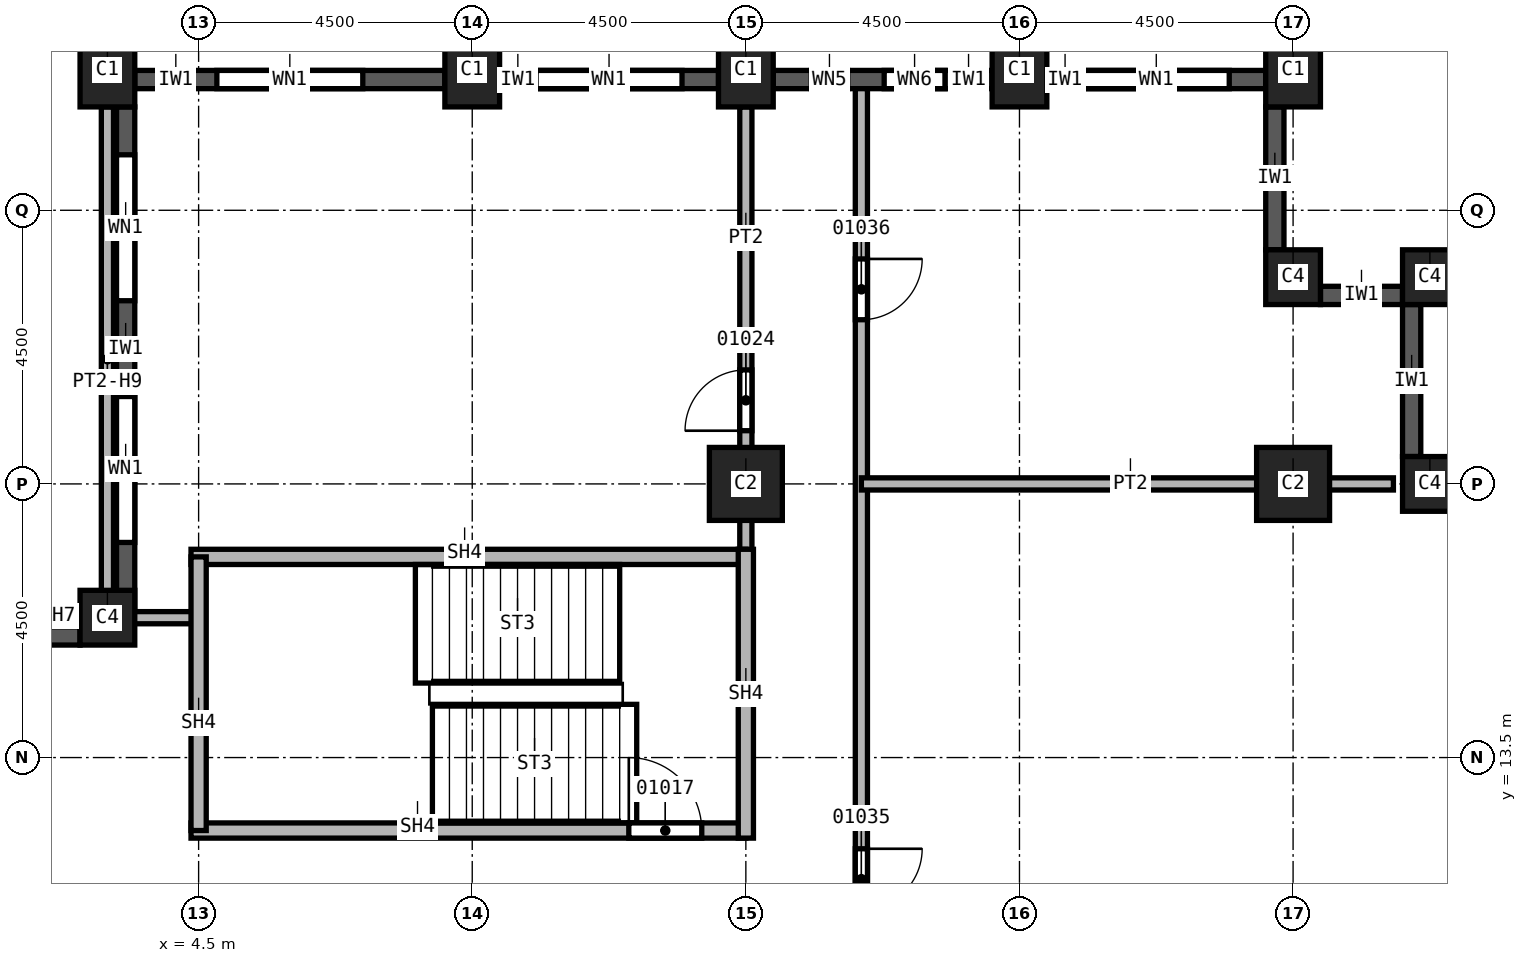
"""IFC4 building model, lengths in metres.
Left out: names, types, materials, properties, quantities, classifications, styles, units other than length and angle.
Written with IfcOpenShell. Run it as: python <this file> out.ifc"""

import sys

from ifc_helpers import new_model, si_unit, direction, frame, frame_2d, origin, origin_2d, place, context, subcontext, project, spatial, rectangle, extrude, element, fill, save


model = new_model("IFC4")
c1 = context("Model", 3, precision=1e-05, world=origin(), true_north=direction((0.0, 1.0)))
c2 = subcontext(c1, "Body", "Model", "MODEL_VIEW")
j1 = project(units=[si_unit("LENGTHUNIT", "METRE"), si_unit("PLANEANGLEUNIT", "RADIAN")], contexts=[c1])
p1 = place(None, origin())
s1 = spatial("IfcSite", under=j1, at=p1, CompositionType="ELEMENT")
p2 = place(p1, origin())
s2 = spatial("IfcBuilding", under=s1, at=p2, CompositionType="ELEMENT")
p3 = place(p2, frame((0.0, 0.0, 68.0)))
s3 = spatial("IfcBuildingStorey", under=s2, at=p3, CompositionType="ELEMENT", Elevation=68.0)
for number, where, z_axis, x_axis in (
    (1, (13.5, 18.0, 0.0), (0.0, 0.0, 1.0), (1.0, 0.0, 0.0)),
    (2, (22.5, 18.0, 0.0), (0.0, 0.0, 1.0), (1.0, 0.0, 0.0)),
):
    element("IfcColumn", number, at=place(p3, frame(where, z_axis=z_axis, x_axis=x_axis)), inside=s3, PredefinedType="COLUMN", context=c2, shape_type="SweptSolid", body=[
        extrude(rectangle(XDim=1.2, YDim=1.2, at=origin_2d()), origin(), (0.0, 0.0, 1.0), 3.7),
    ])
for number, where, z_axis, x_axis in (
    (3, (3.0, 24.8, 0.0), (0.0, 0.0, 1.0), (1.0, 0.0, 0.0)),
    (4, (9.0, 24.8, 0.0), (0.0, 0.0, 1.0), (1.0, 0.0, 0.0)),
    (5, (13.5, 24.8, 0.0), (0.0, 0.0, 1.0), (1.0, 0.0, 0.0)),
    (6, (18.0, 24.8, 0.0), (0.0, 0.0, 1.0), (1.0, 0.0, 0.0)),
    (7, (22.5, 24.8, 0.0), (0.0, 0.0, 1.0), (1.0, 0.0, 0.0)),
):
    element("IfcColumn", number, at=place(p3, frame(where, z_axis=z_axis, x_axis=x_axis)), inside=s3, PredefinedType="COLUMN", context=c2, shape_type="SweptSolid", body=[
        extrude(rectangle(XDim=0.9, YDim=1.2, at=origin_2d()), origin(), (0.0, 0.0, 1.0), 3.7),
    ])
for number, where, z_axis, x_axis in (
    (8, (3.0, 15.8, 0.0), (0.0, 0.0, 1.0), (1.0, 0.0, 0.0)),
    (9, (22.5, 21.4, 0.0), (0.0, 0.0, 1.0), (1.0, 0.0, 0.0)),
    (10, (24.75, 21.4, 0.0), (0.0, 0.0, 1.0), (1.0, 0.0, 0.0)),
    (11, (24.75, 18.0, 0.0), (0.0, 0.0, 1.0), (1.0, 0.0, 0.0)),
):
    element("IfcColumn", number, at=place(p3, frame(where, z_axis=z_axis, x_axis=x_axis)), inside=s3, PredefinedType="COLUMN", context=c2, shape_type="SweptSolid", body=[
        extrude(rectangle(XDim=0.9, YDim=0.9, at=origin_2d()), origin(), (0.0, 0.0, 1.0), 3.7),
    ])
p4 = place(p3, frame((24.45, 18.45, 0.0), z_axis=(0.0, 0.0, 1.0), x_axis=(0.0, 1.0, 0.0)))
e12 = element("IfcWall", 12, at=p4, inside=s3, PredefinedType="SOLIDWALL", context=c2, shape_type="SweptSolid", body=[
    extrude(rectangle(XDim=2.5, YDim=0.3, at=frame_2d((1.25, 0.0))), origin(), (0.0, 0.0, 1.0), 3.1),
])
p5 = place(p3, frame((24.3, 21.1, 0.0), z_axis=(0.0, 0.0, 1.0), x_axis=(-1.0, 0.0, 0.0)))
e13 = element("IfcWall", 13, at=p5, inside=s3, PredefinedType="SOLIDWALL", context=c2, shape_type="SweptSolid", body=[
    extrude(rectangle(XDim=1.35, YDim=0.3, at=frame_2d((0.675, 0.0))), origin(), (0.0, 0.0, 1.0), 3.1),
])
p6 = place(p3, frame((22.2, 21.85, 0.0), z_axis=(0.0, 0.0, 1.0), x_axis=(0.0, 1.0, 0.0)))
e14 = element("IfcWall", 14, at=p6, inside=s3, PredefinedType="SOLIDWALL", context=c2, shape_type="SweptSolid", body=[
    extrude(rectangle(XDim=2.35, YDim=0.3, at=frame_2d((1.175, 0.0))), origin(), (0.0, 0.0, 1.0), 3.1),
])
p7 = place(p3, frame((22.05, 24.65, 0.0), z_axis=(0.0, 0.0, 1.0), x_axis=(-1.0, 0.0, 0.0)))
e15 = element("IfcWall", 15, at=p7, inside=s3, PredefinedType="SOLIDWALL", context=c2, shape_type="SweptSolid", body=[
    extrude(rectangle(XDim=3.6, YDim=0.3, at=frame_2d((1.8, 0.0))), origin(), (0.0, 0.0, 1.0), 3.1),
])
p8 = place(p7, frame((0.6, 0.0, 0.8)))
e16 = element("IfcOpeningElement", 16, at=p8, cuts=e15, PredefinedType="OPENING", context=c2, shape_type="SweptSolid", body=[
    extrude(rectangle(XDim=2.4, YDim=1.95, at=frame_2d((1.2, 0.975))), frame((0.0, 0.15, 0.0), z_axis=(0.0, -1.0, 0.0), x_axis=(1.0, 0.0, 0.0)), (0.0, 0.0, 1.0), 0.3),
])
p9 = place(p3, frame((17.55, 24.65, 0.0), z_axis=(0.0, 0.0, 1.0), x_axis=(-1.0, 0.0, 0.0)))
e17 = element("IfcWall", 17, at=p9, inside=s3, PredefinedType="SOLIDWALL", context=c2, shape_type="SweptSolid", body=[
    extrude(rectangle(XDim=3.6, YDim=0.3, at=frame_2d((1.8, 0.0))), origin(), (0.0, 0.0, 1.0), 3.1),
])
p10 = place(p9, frame((0.775, 0.0, 0.8)))
e18 = element("IfcOpeningElement", 18, at=p10, cuts=e17, PredefinedType="OPENING", context=c2, shape_type="SweptSolid", body=[
    extrude(rectangle(XDim=1.0, YDim=1.95, at=frame_2d((0.5, 0.975))), frame((0.0, 0.15, 0.0), z_axis=(0.0, -1.0, 0.0), x_axis=(1.0, 0.0, 0.0)), (0.0, 0.0, 1.0), 0.3),
])
p11 = place(p9, frame((2.375, 0.0, 0.8)))
e19 = element("IfcOpeningElement", 19, at=p11, cuts=e17, PredefinedType="OPENING", context=c2, shape_type="SweptSolid", body=[
    extrude(rectangle(XDim=0.6, YDim=1.95, at=frame_2d((0.3, 0.975))), frame((0.0, 0.15, 0.0), z_axis=(0.0, -1.0, 0.0), x_axis=(1.0, 0.0, 0.0)), (0.0, 0.0, 1.0), 0.3),
])
p12 = place(p3, frame((13.05, 24.65, 0.0), z_axis=(0.0, 0.0, 1.0), x_axis=(-1.0, 0.0, 0.0)))
e20 = element("IfcWall", 20, at=p12, inside=s3, PredefinedType="SOLIDWALL", context=c2, shape_type="SweptSolid", body=[
    extrude(rectangle(XDim=3.6, YDim=0.3, at=frame_2d((1.8, 0.0))), origin(), (0.0, 0.0, 1.0), 3.1),
])
p13 = place(p12, frame((0.6, 0.0, 0.8)))
e21 = element("IfcOpeningElement", 21, at=p13, cuts=e20, PredefinedType="OPENING", context=c2, shape_type="SweptSolid", body=[
    extrude(rectangle(XDim=2.4, YDim=1.95, at=frame_2d((1.2, 0.975))), frame((0.0, 0.15, 0.0), z_axis=(0.0, -1.0, 0.0), x_axis=(1.0, 0.0, 0.0)), (0.0, 0.0, 1.0), 0.3),
])
p14 = place(p3, frame((8.55, 24.65, 0.0), z_axis=(0.0, 0.0, 1.0), x_axis=(-1.0, 0.0, 0.0)))
e22 = element("IfcWall", 22, at=p14, inside=s3, PredefinedType="SOLIDWALL", context=c2, shape_type="SweptSolid", body=[
    extrude(rectangle(XDim=5.1, YDim=0.3, at=frame_2d((2.55, 0.0))), origin(), (0.0, 0.0, 1.0), 3.1),
])
p15 = place(p14, frame((1.35, 0.0, 0.8)))
e23 = element("IfcOpeningElement", 23, at=p15, cuts=e22, PredefinedType="OPENING", context=c2, shape_type="SweptSolid", body=[
    extrude(rectangle(XDim=2.4, YDim=1.95, at=frame_2d((1.2, 0.975))), frame((0.0, 0.15, 0.0), z_axis=(0.0, -1.0, 0.0), x_axis=(1.0, 0.0, 0.0)), (0.0, 0.0, 1.0), 0.3),
])
p16 = place(p3, frame((3.3, 24.2, 0.0), z_axis=(0.0, 0.0, 1.0), x_axis=(0.0, -1.0, 0.0)))
e24 = element("IfcWall", 24, at=p16, inside=s3, PredefinedType="SOLIDWALL", context=c2, shape_type="SweptSolid", body=[
    extrude(rectangle(XDim=8.35, YDim=0.3, at=frame_2d((4.175, 0.0))), origin(), (0.0, 0.0, 1.0), 3.1),
])
p17 = place(p16, frame((0.788, 0.0, 0.8)))
e25 = element("IfcOpeningElement", 25, at=p17, cuts=e24, PredefinedType="OPENING", context=c2, shape_type="SweptSolid", body=[
    extrude(rectangle(XDim=2.4, YDim=1.95, at=frame_2d((1.2, 0.975))), frame((0.0, 0.15, 0.0), z_axis=(0.0, -1.0, 0.0), x_axis=(1.0, 0.0, 0.0)), (0.0, 0.0, 1.0), 0.3),
])
p18 = place(p16, frame((4.762, 0.0, 0.8)))
e26 = element("IfcOpeningElement", 26, at=p18, cuts=e24, PredefinedType="OPENING", context=c2, shape_type="SweptSolid", body=[
    extrude(rectangle(XDim=2.4, YDim=1.95, at=frame_2d((1.2, 0.975))), frame((0.0, 0.15, 0.0), z_axis=(0.0, -1.0, 0.0), x_axis=(1.0, 0.0, 0.0)), (0.0, 0.0, 1.0), 0.3),
])
p19 = place(p3, frame((-2.55, 15.5, 0.0), z_axis=(0.0, 0.0, 1.0), x_axis=(1.0, 0.0, 0.0)))
e27 = element("IfcWall", 27, at=p19, inside=s3, PredefinedType="SOLIDWALL", context=c2, shape_type="SweptSolid", body=[
    extrude(rectangle(XDim=5.1, YDim=0.3, at=frame_2d((2.55, 0.0))), origin(), (0.0, 0.0, 1.0), 3.1),
])
p20 = place(p19, frame((1.95, 0.0, 0.0)))
e28 = element("IfcOpeningElement", 28, at=p20, cuts=e27, PredefinedType="OPENING", context=c2, shape_type="SweptSolid", body=[
    extrude(rectangle(XDim=1.2, YDim=2.4, at=frame_2d((0.6, 1.2))), frame((0.0, 0.15, 0.0), z_axis=(0.0, -1.0, 0.0), x_axis=(1.0, 0.0, 0.0)), (0.0, 0.0, 1.0), 0.3),
])
p21 = place(p3, frame((0.9, 15.8, 0.0), z_axis=(0.0, 0.0, 1.0), x_axis=(1.0, 0.0, 0.0)))
e29 = element("IfcWall", 29, at=p21, inside=s3, PredefinedType="PARTITIONING", context=c2, shape_type="SweptSolid", body=[
    extrude(rectangle(XDim=3.6, YDim=0.2, at=frame_2d((1.8, 0.0))), origin(), (0.0, 0.0, 1.0), 3.083),
])
p22 = place(p3, frame((3.0, 24.2, 0.0), z_axis=(0.0, 0.0, 1.0), x_axis=(0.0, -1.0, 0.0)))
e30 = element("IfcWall", 30, at=p22, inside=s3, PredefinedType="PARTITIONING", context=c2, shape_type="SweptSolid", body=[
    extrude(rectangle(XDim=8.4, YDim=0.2, at=frame_2d((4.2, 0.0))), origin(), (0.0, 0.0, 1.0), 2.854),
])
p23 = place(p3, frame((13.5, 16.675, 0.0), z_axis=(0.0, 0.0, 1.0), x_axis=(0.0, 1.0, 0.0)))
e31 = element("IfcWall", 31, at=p23, inside=s3, PredefinedType="PARTITIONING", context=c2, shape_type="SweptSolid", body=[
    extrude(rectangle(XDim=7.525, YDim=0.2, at=frame_2d((3.762, 0.0))), origin(), (0.0, 0.0, 1.0), 3.7),
])
p24 = place(p23, frame((2.2, 0.0, 0.0)))
e32 = element("IfcOpeningElement", 32, at=p24, cuts=e31, PredefinedType="OPENING", context=c2, shape_type="SweptSolid", body=[
    extrude(rectangle(XDim=1.0, YDim=2.1, at=frame_2d((0.5, 1.05))), frame((0.0, 0.1, 0.0), z_axis=(0.0, -1.0, 0.0), x_axis=(1.0, 0.0, 0.0)), (0.0, 0.0, 1.0), 0.2),
])
p25 = place(p3, frame((15.4, 24.5, 0.0), z_axis=(0.0, 0.0, 1.0), x_axis=(0.0, -1.0, 0.0)))
e33 = element("IfcWall", 33, at=p25, inside=s3, PredefinedType="PARTITIONING", context=c2, shape_type="SweptSolid", body=[
    extrude(rectangle(XDim=25.35, YDim=0.2, at=frame_2d((12.675, 0.0))), origin(), (0.0, 0.0, 1.0), 3.7),
])
p26 = place(p25, frame((23.75, 0.0, 0.0)))
e34 = element("IfcOpeningElement", 34, at=p26, cuts=e33, PredefinedType="OPENING", context=c2, shape_type="SweptSolid", body=[
    extrude(rectangle(XDim=1.0, YDim=2.1, at=frame_2d((0.5, 1.05))), frame((0.0, 0.1, 0.0), z_axis=(0.0, -1.0, 0.0), x_axis=(1.0, 0.0, 0.0)), (0.0, 0.0, 1.0), 0.2),
])
p27 = place(p25, frame((12.5, 0.0, 0.0)))
e35 = element("IfcOpeningElement", 35, at=p27, cuts=e33, PredefinedType="OPENING", context=c2, shape_type="SweptSolid", body=[
    extrude(rectangle(XDim=1.0, YDim=2.1, at=frame_2d((0.5, 1.05))), frame((0.0, 0.1, 0.0), z_axis=(0.0, -1.0, 0.0), x_axis=(1.0, 0.0, 0.0)), (0.0, 0.0, 1.0), 0.2),
])
p28 = place(p25, frame((2.8, 0.0, 0.0)))
e36 = element("IfcOpeningElement", 36, at=p28, cuts=e33, PredefinedType="OPENING", context=c2, shape_type="SweptSolid", body=[
    extrude(rectangle(XDim=1.0, YDim=2.1, at=frame_2d((0.5, 1.05))), frame((0.0, 0.1, 0.0), z_axis=(0.0, -1.0, 0.0), x_axis=(1.0, 0.0, 0.0)), (0.0, 0.0, 1.0), 0.2),
])
p29 = place(p3, frame((15.4, 18.0, 0.0), z_axis=(0.0, 0.0, 1.0), x_axis=(1.0, 0.0, 0.0)))
e37 = element("IfcWall", 37, at=p29, inside=s3, PredefinedType="PARTITIONING", context=c2, shape_type="SweptSolid", body=[
    extrude(rectangle(XDim=8.75, YDim=0.2, at=frame_2d((4.375, 0.0))), origin(), (0.0, 0.0, 1.0), 3.7),
])
p30 = place(p3, frame((4.375, 12.3, 0.0), z_axis=(0.0, 0.0, 1.0), x_axis=(1.0, 0.0, 0.0)))
e38 = element("IfcWall", 38, at=p30, inside=s3, PredefinedType="SOLIDWALL", context=c2, shape_type="SweptSolid", body=[
    extrude(rectangle(XDim=9.125, YDim=0.25, at=frame_2d((4.562, 0.0))), origin(), (0.0, 0.0, 1.0), 3.7),
])
p31 = place(p30, frame((7.2, 0.0, 0.0)))
e39 = element("IfcOpeningElement", 39, at=p31, cuts=e38, PredefinedType="OPENING", context=c2, shape_type="SweptSolid", body=[
    extrude(rectangle(XDim=1.2, YDim=2.1, at=frame_2d((0.6, 1.05))), frame((0.0, 0.125, 0.0), z_axis=(0.0, -1.0, 0.0), x_axis=(1.0, 0.0, 0.0)), (0.0, 0.0, 1.0), 0.25),
])
p32 = place(p3, frame((4.375, 16.8, 0.0), z_axis=(0.0, 0.0, 1.0), x_axis=(1.0, 0.0, 0.0)))
e40 = element("IfcWall", 40, at=p32, inside=s3, PredefinedType="SOLIDWALL", context=c2, shape_type="SweptSolid", body=[
    extrude(rectangle(XDim=9.125, YDim=0.25, at=frame_2d((4.562, 0.0))), origin(), (0.0, 0.0, 1.0), 3.7),
])
p33 = place(p3, frame((4.5, 12.3, 0.0), z_axis=(0.0, 0.0, 1.0), x_axis=(0.0, 1.0, 0.0)))
e41 = element("IfcWall", 41, at=p33, inside=s3, PredefinedType="SOLIDWALL", context=c2, shape_type="SweptSolid", body=[
    extrude(rectangle(XDim=4.5, YDim=0.25, at=frame_2d((2.25, 0.0))), origin(), (0.0, 0.0, 1.0), 3.7),
])
p34 = place(p3, frame((13.5, 12.175, 0.0), z_axis=(0.0, 0.0, 1.0), x_axis=(0.0, 1.0, 0.0)))
e42 = element("IfcWall", 42, at=p34, inside=s3, PredefinedType="SOLIDWALL", context=c2, shape_type="SweptSolid", body=[
    extrude(rectangle(XDim=4.75, YDim=0.25, at=frame_2d((2.375, 0.0))), origin(), (0.0, 0.0, 1.0), 3.7),
])
p35 = place(p8, origin())
e43 = element("IfcWindow", 43, at=p35, inside=s3, PartitioningType="SINGLE_PANEL", PredefinedType="WINDOW", context=c2, shape_type="SweptSolid", body=[
    extrude(rectangle(XDim=2.4, YDim=1.95, at=frame_2d((1.2, 0.975))), frame((0.0, 0.03, 0.0), z_axis=(0.0, -1.0, 0.0), x_axis=(1.0, 0.0, 0.0)), (0.0, 0.0, 1.0), 0.06),
])
fill(e16, e43)
p36 = place(p13, origin())
e44 = element("IfcWindow", 44, at=p36, inside=s3, PartitioningType="SINGLE_PANEL", PredefinedType="WINDOW", context=c2, shape_type="SweptSolid", body=[
    extrude(rectangle(XDim=2.4, YDim=1.95, at=frame_2d((1.2, 0.975))), frame((0.0, 0.03, 0.0), z_axis=(0.0, -1.0, 0.0), x_axis=(1.0, 0.0, 0.0)), (0.0, 0.0, 1.0), 0.06),
])
fill(e21, e44)
p37 = place(p15, origin())
e45 = element("IfcWindow", 45, at=p37, inside=s3, PartitioningType="SINGLE_PANEL", PredefinedType="WINDOW", context=c2, shape_type="SweptSolid", body=[
    extrude(rectangle(XDim=2.4, YDim=1.95, at=frame_2d((1.2, 0.975))), frame((0.0, 0.03, 0.0), z_axis=(0.0, -1.0, 0.0), x_axis=(1.0, 0.0, 0.0)), (0.0, 0.0, 1.0), 0.06),
])
fill(e23, e45)
p38 = place(p17, origin())
e46 = element("IfcWindow", 46, at=p38, inside=s3, PartitioningType="SINGLE_PANEL", PredefinedType="WINDOW", context=c2, shape_type="SweptSolid", body=[
    extrude(rectangle(XDim=2.4, YDim=1.95, at=frame_2d((1.2, 0.975))), frame((0.0, 0.03, 0.0), z_axis=(0.0, -1.0, 0.0), x_axis=(1.0, 0.0, 0.0)), (0.0, 0.0, 1.0), 0.06),
])
fill(e25, e46)
p39 = place(p18, origin())
e47 = element("IfcWindow", 47, at=p39, inside=s3, PartitioningType="SINGLE_PANEL", PredefinedType="WINDOW", context=c2, shape_type="SweptSolid", body=[
    extrude(rectangle(XDim=2.4, YDim=1.95, at=frame_2d((1.2, 0.975))), frame((0.0, 0.03, 0.0), z_axis=(0.0, -1.0, 0.0), x_axis=(1.0, 0.0, 0.0)), (0.0, 0.0, 1.0), 0.06),
])
fill(e26, e47)
p40 = place(p31, origin())
e48 = element("IfcDoor", 48, at=p40, inside=s3, OperationType="SINGLE_SWING_RIGHT", PredefinedType="DOOR", context=c2, shape_type="SweptSolid", body=[
    extrude(rectangle(XDim=1.2, YDim=2.1, at=frame_2d((0.6, 1.05))), frame((0.0, 0.025, 0.0), z_axis=(0.0, -1.0, 0.0), x_axis=(1.0, 0.0, 0.0)), (0.0, 0.0, 1.0), 0.05),
])
fill(e39, e48)
p41 = place(p24, origin())
e49 = element("IfcDoor", 49, at=p41, inside=s3, OperationType="SINGLE_SWING_LEFT", PredefinedType="DOOR", context=c2, shape_type="SweptSolid", body=[
    extrude(rectangle(XDim=1.0, YDim=2.1, at=frame_2d((0.5, 1.05))), frame((0.0, 0.025, 0.0), z_axis=(0.0, -1.0, 0.0), x_axis=(1.0, 0.0, 0.0)), (0.0, 0.0, 1.0), 0.05),
])
fill(e32, e49)
p42 = place(p27, origin())
e50 = element("IfcDoor", 50, at=p42, inside=s3, OperationType="SINGLE_SWING_RIGHT", PredefinedType="DOOR", context=c2, shape_type="SweptSolid", body=[
    extrude(rectangle(XDim=1.0, YDim=2.1, at=frame_2d((0.5, 1.05))), frame((0.0, 0.025, 0.0), z_axis=(0.0, -1.0, 0.0), x_axis=(1.0, 0.0, 0.0)), (0.0, 0.0, 1.0), 0.05),
])
fill(e35, e50)
p43 = place(p28, origin())
e51 = element("IfcDoor", 51, at=p43, inside=s3, OperationType="SINGLE_SWING_LEFT", PredefinedType="DOOR", context=c2, shape_type="SweptSolid", body=[
    extrude(rectangle(XDim=1.0, YDim=2.1, at=frame_2d((0.5, 1.05))), frame((0.0, 0.025, 0.0), z_axis=(0.0, -1.0, 0.0), x_axis=(1.0, 0.0, 0.0)), (0.0, 0.0, 1.0), 0.05),
])
fill(e36, e51)
p44 = place(p10, origin())
e52 = element("IfcWindow", 52, at=p44, inside=s3, PartitioningType="SINGLE_PANEL", PredefinedType="WINDOW", context=c2, shape_type="SweptSolid", body=[
    extrude(rectangle(XDim=1.0, YDim=1.95, at=frame_2d((0.5, 0.975))), frame((0.0, 0.03, 0.0), z_axis=(0.0, -1.0, 0.0), x_axis=(1.0, 0.0, 0.0)), (0.0, 0.0, 1.0), 0.06),
])
fill(e18, e52)
p45 = place(p11, origin())
e53 = element("IfcWindow", 53, at=p45, inside=s3, PartitioningType="SINGLE_PANEL", PredefinedType="WINDOW", context=c2, shape_type="SweptSolid", body=[
    extrude(rectangle(XDim=0.6, YDim=1.95, at=frame_2d((0.3, 0.975))), frame((0.0, 0.03, 0.0), z_axis=(0.0, -1.0, 0.0), x_axis=(1.0, 0.0, 0.0)), (0.0, 0.0, 1.0), 0.06),
])
fill(e19, e53)
save(model, sys.argv[1])
